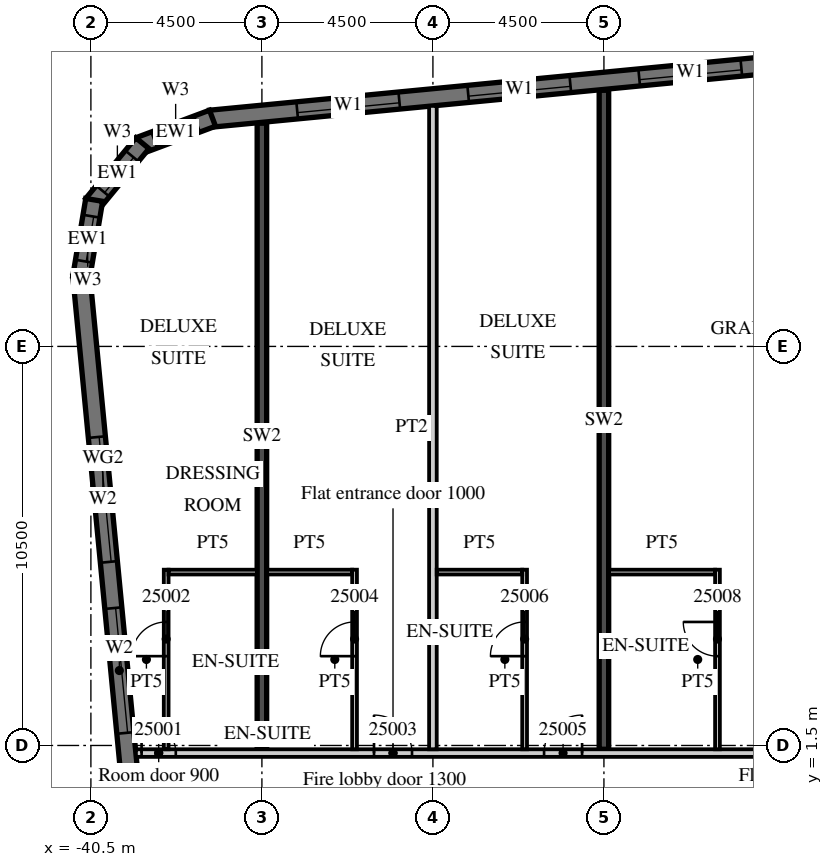
"""IFC4 building model, lengths in metres.
Left out: names, types, materials, properties, quantities, classifications, styles, units other than length and angle.
Written with IfcOpenShell. Run it as: python <this file> out.ifc"""

import sys

from ifc_helpers import new_model, si_unit, direction, frame, frame_2d, origin, place, context, subcontext, project, spatial, polyline, rectangle, outline, extrude, element, fill, save


model = new_model("IFC4")
c1 = context("Model", 3, precision=1e-05, world=origin(), true_north=direction((0.0, 1.0)))
c2 = subcontext(c1, "Body", "Model", "MODEL_VIEW")
j1 = project(units=[si_unit("LENGTHUNIT", "METRE"), si_unit("PLANEANGLEUNIT", "RADIAN")], contexts=[c1])
p1 = place(None, origin())
s1 = spatial("IfcSite", under=j1, at=p1, CompositionType="ELEMENT")
p2 = place(p1, origin())
s2 = spatial("IfcBuilding", under=s1, at=p2, CompositionType="ELEMENT")
p3 = place(p2, frame((0.0, 0.0, 117.4)))
s3 = spatial("IfcBuildingStorey", under=s2, at=p3, CompositionType="ELEMENT", Elevation=117.4)
p4 = place(p3, frame((-36.0, 1.4, 0.0), z_axis=(0.0, 0.0, 1.0), x_axis=(0.0, 1.0, 0.0)))
e1 = element("IfcWall", 1, at=p4, inside=s3, PredefinedType="SHEAR", context=c2, shape_type="SweptSolid", body=[
    extrude(rectangle(XDim=16.474, YDim=0.25, at=frame_2d((8.237, 0.0))), origin(), (0.0, 0.0, 1.0), 3.3),
])
p5 = place(p3, frame((-27.0, 1.4, 0.0), z_axis=(0.0, 0.0, 1.0), x_axis=(0.0, 1.0, 0.0)))
e2 = element("IfcWall", 2, at=p5, inside=s3, PredefinedType="SHEAR", context=c2, shape_type="SweptSolid", body=[
    extrude(rectangle(XDim=17.34, YDim=0.25, at=frame_2d((8.67, 0.0))), origin(), (0.0, 0.0, 1.0), 3.3),
])
p6 = place(p3, frame((-40.753, 13.872, 0.0), z_axis=(0.0, 0.0, 1.0), x_axis=(0.095843327381, -0.995396431878, 0.0)))
e3 = element("IfcWall", 3, at=p6, inside=s3, PredefinedType="SOLIDWALL", context=c2, shape_type="SweptSolid", body=[
    extrude(rectangle(XDim=35.0, YDim=0.45, at=frame_2d((17.5, 0.0))), origin(), (0.0, 0.0, 1.0), 3.02),
])
p7 = place(p6, frame((4.277, 0.0, 0.45)))
e4 = element("IfcOpeningElement", 4, at=p7, cuts=e3, PredefinedType="OPENING", context=c2, shape_type="SweptSolid", body=[
    extrude(rectangle(XDim=3.3, YDim=2.25, at=frame_2d((1.65, 1.125))), frame((0.0, 0.235, 0.0), z_axis=(0.0, -1.0, 0.0), x_axis=(1.0, 0.0, 0.0)), (0.0, 0.0, 1.0), 0.47),
])
p8 = place(p6, frame((8.798, 0.0, 0.45)))
e5 = element("IfcOpeningElement", 5, at=p8, cuts=e3, PredefinedType="OPENING", context=c2, shape_type="SweptSolid", body=[
    extrude(rectangle(XDim=3.3, YDim=2.25, at=frame_2d((1.65, 1.125))), frame((0.0, 0.235, 0.0), z_axis=(0.0, -1.0, 0.0), x_axis=(1.0, 0.0, 0.0)), (0.0, 0.0, 1.0), 0.47),
])
p9 = place(p3, frame((13.521, 22.89, 0.0), z_axis=(0.0, 0.0, 1.0), x_axis=(-0.995396445054, -0.095843190545, 0.0)))
e6 = element("IfcWall", 6, at=p9, inside=s3, PredefinedType="SOLIDWALL", context=c2, shape_type="SweptSolid", body=[
    extrude(rectangle(XDim=51.114, YDim=0.45, at=frame_2d((25.557, 0.0))), origin(), (0.0, 0.0, 1.0), 3.02),
])
p10 = place(p9, frame((0.91, 0.0, 0.45)))
e7 = element("IfcOpeningElement", 7, at=p10, cuts=e6, PredefinedType="OPENING", context=c2, shape_type="SweptSolid", body=[
    extrude(rectangle(XDim=2.7, YDim=2.25, at=frame_2d((1.35, 1.125))), frame((0.0, 0.235, 0.0), z_axis=(0.0, -1.0, 0.0), x_axis=(1.0, 0.0, 0.0)), (0.0, 0.0, 1.0), 0.47),
])
p11 = place(p9, frame((5.431, 0.0, 0.45)))
e8 = element("IfcOpeningElement", 8, at=p11, cuts=e6, PredefinedType="OPENING", context=c2, shape_type="SweptSolid", body=[
    extrude(rectangle(XDim=2.7, YDim=2.25, at=frame_2d((1.35, 1.125))), frame((0.0, 0.235, 0.0), z_axis=(0.0, -1.0, 0.0), x_axis=(1.0, 0.0, 0.0)), (0.0, 0.0, 1.0), 0.47),
])
p12 = place(p9, frame((9.952, 0.0, 0.45)))
e9 = element("IfcOpeningElement", 9, at=p12, cuts=e6, PredefinedType="OPENING", context=c2, shape_type="SweptSolid", body=[
    extrude(rectangle(XDim=2.7, YDim=2.25, at=frame_2d((1.35, 1.125))), frame((0.0, 0.235, 0.0), z_axis=(0.0, -1.0, 0.0), x_axis=(1.0, 0.0, 0.0)), (0.0, 0.0, 1.0), 0.47),
])
p13 = place(p9, frame((14.473, 0.0, 0.45)))
e10 = element("IfcOpeningElement", 10, at=p13, cuts=e6, PredefinedType="OPENING", context=c2, shape_type="SweptSolid", body=[
    extrude(rectangle(XDim=2.7, YDim=2.25, at=frame_2d((1.35, 1.125))), frame((0.0, 0.235, 0.0), z_axis=(0.0, -1.0, 0.0), x_axis=(1.0, 0.0, 0.0)), (0.0, 0.0, 1.0), 0.47),
])
p14 = place(p9, frame((18.994, 0.0, 0.45)))
e11 = element("IfcOpeningElement", 11, at=p14, cuts=e6, PredefinedType="OPENING", context=c2, shape_type="SweptSolid", body=[
    extrude(rectangle(XDim=2.7, YDim=2.25, at=frame_2d((1.35, 1.125))), frame((0.0, 0.235, 0.0), z_axis=(0.0, -1.0, 0.0), x_axis=(1.0, 0.0, 0.0)), (0.0, 0.0, 1.0), 0.47),
])
p15 = place(p9, frame((23.514, 0.0, 0.45)))
e12 = element("IfcOpeningElement", 12, at=p15, cuts=e6, PredefinedType="OPENING", context=c2, shape_type="SweptSolid", body=[
    extrude(rectangle(XDim=2.7, YDim=2.25, at=frame_2d((1.35, 1.125))), frame((0.0, 0.235, 0.0), z_axis=(0.0, -1.0, 0.0), x_axis=(1.0, 0.0, 0.0)), (0.0, 0.0, 1.0), 0.47),
])
p16 = place(p9, frame((28.035, 0.0, 0.45)))
e13 = element("IfcOpeningElement", 13, at=p16, cuts=e6, PredefinedType="OPENING", context=c2, shape_type="SweptSolid", body=[
    extrude(rectangle(XDim=2.7, YDim=2.25, at=frame_2d((1.35, 1.125))), frame((0.0, 0.235, 0.0), z_axis=(0.0, -1.0, 0.0), x_axis=(1.0, 0.0, 0.0)), (0.0, 0.0, 1.0), 0.47),
])
p17 = place(p9, frame((32.556, 0.0, 0.45)))
e14 = element("IfcOpeningElement", 14, at=p17, cuts=e6, PredefinedType="OPENING", context=c2, shape_type="SweptSolid", body=[
    extrude(rectangle(XDim=2.7, YDim=2.25, at=frame_2d((1.35, 1.125))), frame((0.0, 0.235, 0.0), z_axis=(0.0, -1.0, 0.0), x_axis=(1.0, 0.0, 0.0)), (0.0, 0.0, 1.0), 0.47),
])
p18 = place(p9, frame((37.077, 0.0, 0.45)))
e15 = element("IfcOpeningElement", 15, at=p18, cuts=e6, PredefinedType="OPENING", context=c2, shape_type="SweptSolid", body=[
    extrude(rectangle(XDim=2.7, YDim=2.25, at=frame_2d((1.35, 1.125))), frame((0.0, 0.235, 0.0), z_axis=(0.0, -1.0, 0.0), x_axis=(1.0, 0.0, 0.0)), (0.0, 0.0, 1.0), 0.47),
])
p19 = place(p9, frame((41.598, 0.0, 0.45)))
e16 = element("IfcOpeningElement", 16, at=p19, cuts=e6, PredefinedType="OPENING", context=c2, shape_type="SweptSolid", body=[
    extrude(rectangle(XDim=2.7, YDim=2.25, at=frame_2d((1.35, 1.125))), frame((0.0, 0.235, 0.0), z_axis=(0.0, -1.0, 0.0), x_axis=(1.0, 0.0, 0.0)), (0.0, 0.0, 1.0), 0.47),
])
p20 = place(p9, frame((46.118, 0.0, 0.45)))
e17 = element("IfcOpeningElement", 17, at=p20, cuts=e6, PredefinedType="OPENING", context=c2, shape_type="SweptSolid", body=[
    extrude(rectangle(XDim=2.7, YDim=2.25, at=frame_2d((1.35, 1.125))), frame((0.0, 0.235, 0.0), z_axis=(0.0, -1.0, 0.0), x_axis=(1.0, 0.0, 0.0)), (0.0, 0.0, 1.0), 0.47),
])
p21 = place(p3, frame((-37.3, 18.004, 0.0), z_axis=(0.0, 0.0, 1.0), x_axis=(-0.936677599948, -0.350192909346, 0.0)))
e18 = element("IfcWall", 18, at=p21, inside=s3, PredefinedType="SOLIDWALL", context=c2, shape_type="SweptSolid", body=[
    extrude(outline(polyline([(0.0, -0.225), (2.071, -0.225), (1.95, 0.225), (0.121, 0.225), (0.0, -0.225)])), origin(), (0.0, 0.0, 1.0), 3.02),
])
p22 = place(p21, frame((0.435, 0.0, 0.45)))
e19 = element("IfcOpeningElement", 19, at=p22, cuts=e18, PredefinedType="OPENING", context=c2, shape_type="SweptSolid", body=[
    extrude(rectangle(XDim=1.2, YDim=2.25, at=frame_2d((0.6, 1.125))), frame((0.0, 0.235, 0.0), z_axis=(0.0, -1.0, 0.0), x_axis=(1.0, 0.0, 0.0)), (0.0, 0.0, 1.0), 0.47),
])
p23 = place(p3, frame((-39.145, 17.347, 0.0), z_axis=(0.0, 0.0, 1.0), x_axis=(-0.636046112757, -0.771651049663, 0.0)))
e20 = element("IfcWall", 20, at=p23, inside=s3, PredefinedType="SOLIDWALL", context=c2, shape_type="SweptSolid", body=[
    extrude(outline(polyline([(0.0, -0.225), (2.071, -0.225), (1.95, 0.225), (0.121, 0.225), (0.0, -0.225)])), origin(), (0.0, 0.0, 1.0), 3.02),
])
p24 = place(p23, frame((0.435, 0.0, 0.45)))
e21 = element("IfcOpeningElement", 21, at=p24, cuts=e20, PredefinedType="OPENING", context=c2, shape_type="SweptSolid", body=[
    extrude(rectangle(XDim=1.2, YDim=2.25, at=frame_2d((0.6, 1.125))), frame((0.0, 0.235, 0.0), z_axis=(0.0, -1.0, 0.0), x_axis=(1.0, 0.0, 0.0)), (0.0, 0.0, 1.0), 0.47),
])
p25 = place(p3, frame((-40.413, 15.855, 0.0), z_axis=(0.0, 0.0, 1.0), x_axis=(-0.165068144653, -0.986282164302, 0.0)))
e22 = element("IfcWall", 22, at=p25, inside=s3, PredefinedType="SOLIDWALL", context=c2, shape_type="SweptSolid", body=[
    extrude(outline(polyline([(0.0, -0.225), (2.071, -0.225), (1.95, 0.225), (0.121, 0.225), (0.0, -0.225)])), origin(), (0.0, 0.0, 1.0), 3.02),
])
p26 = place(p25, frame((0.435, 0.0, 0.45)))
e23 = element("IfcOpeningElement", 23, at=p26, cuts=e22, PredefinedType="OPENING", context=c2, shape_type="SweptSolid", body=[
    extrude(rectangle(XDim=1.2, YDim=2.25, at=frame_2d((0.6, 1.125))), frame((0.0, 0.235, 0.0), z_axis=(0.0, -1.0, 0.0), x_axis=(1.0, 0.0, 0.0)), (0.0, 0.0, 1.0), 0.47),
])
p27 = place(p3, frame((-39.316, 1.3, 0.0), z_axis=(0.0, 0.0, 1.0), x_axis=(1.0, 0.0, 0.0)))
e24 = element("IfcWall", 24, at=p27, inside=s3, PredefinedType="PARTITIONING", context=c2, shape_type="SweptSolid", body=[
    extrude(rectangle(XDim=52.816, YDim=0.2, at=frame_2d((26.408, 0.0))), origin(), (0.0, 0.0, 1.0), 3.02),
])
p28 = place(p27, frame((0.15, 0.0, 0.0)))
e25 = element("IfcOpeningElement", 25, at=p28, cuts=e24, PredefinedType="OPENING", context=c2, shape_type="SweptSolid", body=[
    extrude(rectangle(XDim=0.9, YDim=2.1, at=frame_2d((0.45, 1.05))), frame((0.0, 0.11, 0.0), z_axis=(0.0, -1.0, 0.0), x_axis=(1.0, 0.0, 0.0)), (0.0, 0.0, 1.0), 0.22),
])
p29 = place(p27, frame((6.266, 0.0, 0.0)))
e26 = element("IfcOpeningElement", 26, at=p29, cuts=e24, PredefinedType="OPENING", context=c2, shape_type="SweptSolid", body=[
    extrude(rectangle(XDim=1.0, YDim=2.1, at=frame_2d((0.5, 1.05))), frame((0.0, 0.11, 0.0), z_axis=(0.0, -1.0, 0.0), x_axis=(1.0, 0.0, 0.0)), (0.0, 0.0, 1.0), 0.22),
])
p30 = place(p27, frame((10.741, 0.0, 0.0)))
e27 = element("IfcOpeningElement", 27, at=p30, cuts=e24, PredefinedType="OPENING", context=c2, shape_type="SweptSolid", body=[
    extrude(rectangle(XDim=1.0, YDim=2.1, at=frame_2d((0.5, 1.05))), frame((0.0, 0.11, 0.0), z_axis=(0.0, -1.0, 0.0), x_axis=(1.0, 0.0, 0.0)), (0.0, 0.0, 1.0), 0.22),
])
p31 = place(p27, frame((17.678, 0.0, 0.0)))
e28 = element("IfcOpeningElement", 28, at=p31, cuts=e24, PredefinedType="OPENING", context=c2, shape_type="SweptSolid", body=[
    extrude(rectangle(XDim=1.2, YDim=2.1, at=frame_2d((0.6, 1.05))), frame((0.0, 0.11, 0.0), z_axis=(0.0, -1.0, 0.0), x_axis=(1.0, 0.0, 0.0)), (0.0, 0.0, 1.0), 0.22),
])
p32 = place(p27, frame((26.678, 0.0, 0.0)))
e29 = element("IfcOpeningElement", 29, at=p32, cuts=e24, PredefinedType="OPENING", context=c2, shape_type="SweptSolid", body=[
    extrude(rectangle(XDim=1.2, YDim=2.1, at=frame_2d((0.6, 1.05))), frame((0.0, 0.11, 0.0), z_axis=(0.0, -1.0, 0.0), x_axis=(1.0, 0.0, 0.0)), (0.0, 0.0, 1.0), 0.22),
])
p33 = place(p27, frame((35.678, 0.0, 0.0)))
e30 = element("IfcOpeningElement", 30, at=p33, cuts=e24, PredefinedType="OPENING", context=c2, shape_type="SweptSolid", body=[
    extrude(rectangle(XDim=1.2, YDim=2.1, at=frame_2d((0.6, 1.05))), frame((0.0, 0.11, 0.0), z_axis=(0.0, -1.0, 0.0), x_axis=(1.0, 0.0, 0.0)), (0.0, 0.0, 1.0), 0.22),
])
p34 = place(p27, frame((41.754, 0.0, 0.0)))
e31 = element("IfcOpeningElement", 31, at=p34, cuts=e24, PredefinedType="OPENING", context=c2, shape_type="SweptSolid", body=[
    extrude(rectangle(XDim=1.2, YDim=2.1, at=frame_2d((0.6, 1.05))), frame((0.0, 0.11, 0.0), z_axis=(0.0, -1.0, 0.0), x_axis=(1.0, 0.0, 0.0)), (0.0, 0.0, 1.0), 0.22),
])
p35 = place(p27, frame((51.241, 0.0, 0.0)))
e32 = element("IfcOpeningElement", 32, at=p35, cuts=e24, PredefinedType="OPENING", context=c2, shape_type="SweptSolid", body=[
    extrude(rectangle(XDim=1.0, YDim=2.1, at=frame_2d((0.5, 1.05))), frame((0.0, 0.11, 0.0), z_axis=(0.0, -1.0, 0.0), x_axis=(1.0, 0.0, 0.0)), (0.0, 0.0, 1.0), 0.22),
])
p36 = place(p3, frame((-38.519, 1.4, 0.0), z_axis=(0.0, 0.0, 1.0), x_axis=(0.0, 1.0, 0.0)))
e33 = element("IfcWall", 33, at=p36, inside=s3, PredefinedType="PARTITIONING", context=c2, shape_type="SweptSolid", body=[
    extrude(rectangle(XDim=4.725, YDim=0.125, at=frame_2d((2.363, 0.0))), origin(), (0.0, 0.0, 1.0), 3.02),
])
p37 = place(p36, frame((2.45, 0.0, 0.0)))
e34 = element("IfcOpeningElement", 34, at=p37, cuts=e33, PredefinedType="OPENING", context=c2, shape_type="SweptSolid", body=[
    extrude(rectangle(XDim=0.9, YDim=2.1, at=frame_2d((0.45, 1.05))), frame((0.0, 0.073, 0.0), z_axis=(0.0, -1.0, 0.0), x_axis=(1.0, 0.0, 0.0)), (0.0, 0.0, 1.0), 0.145),
])
p38 = place(p3, frame((-38.457, 6.062, 0.0), z_axis=(0.0, 0.0, 1.0), x_axis=(1.0, 0.0, 0.0)))
e35 = element("IfcWall", 35, at=p38, inside=s3, PredefinedType="PARTITIONING", context=c2, shape_type="SweptSolid", body=[
    extrude(rectangle(XDim=2.332, YDim=0.125, at=frame_2d((1.166, 0.0))), origin(), (0.0, 0.0, 1.0), 3.02),
])
p39 = place(p3, frame((-31.5, 1.4, 0.0), z_axis=(0.0, 0.0, 1.0), x_axis=(0.0, 1.0, 0.0)))
e36 = element("IfcWall", 36, at=p39, inside=s3, PredefinedType="PARTITIONING", context=c2, shape_type="SweptSolid", body=[
    extrude(rectangle(XDim=16.929, YDim=0.2, at=frame_2d((8.465, 0.0))), origin(), (0.0, 0.0, 1.0), 3.02),
])
p40 = place(p3, frame((-33.562, 1.4, 0.0), z_axis=(0.0, 0.0, 1.0), x_axis=(0.0, 1.0, 0.0)))
e37 = element("IfcWall", 37, at=p40, inside=s3, PredefinedType="PARTITIONING", context=c2, shape_type="SweptSolid", body=[
    extrude(rectangle(XDim=4.725, YDim=0.125, at=frame_2d((2.363, 0.0))), origin(), (0.0, 0.0, 1.0), 3.02),
])
p41 = place(p40, frame((2.45, 0.0, 0.0)))
e38 = element("IfcOpeningElement", 38, at=p41, cuts=e37, PredefinedType="OPENING", context=c2, shape_type="SweptSolid", body=[
    extrude(rectangle(XDim=0.9, YDim=2.1, at=frame_2d((0.45, 1.05))), frame((0.0, 0.073, 0.0), z_axis=(0.0, -1.0, 0.0), x_axis=(1.0, 0.0, 0.0)), (0.0, 0.0, 1.0), 0.145),
])
p42 = place(p3, frame((-35.875, 6.062, 0.0), z_axis=(0.0, 0.0, 1.0), x_axis=(1.0, 0.0, 0.0)))
e39 = element("IfcWall", 39, at=p42, inside=s3, PredefinedType="PARTITIONING", context=c2, shape_type="SweptSolid", body=[
    extrude(rectangle(XDim=2.25, YDim=0.125, at=frame_2d((1.125, 0.0))), origin(), (0.0, 0.0, 1.0), 3.02),
])
p43 = place(p3, frame((-29.087, 1.4, 0.0), z_axis=(0.0, 0.0, 1.0), x_axis=(0.0, 1.0, 0.0)))
e40 = element("IfcWall", 40, at=p43, inside=s3, PredefinedType="PARTITIONING", context=c2, shape_type="SweptSolid", body=[
    extrude(rectangle(XDim=4.725, YDim=0.125, at=frame_2d((2.363, 0.0))), origin(), (0.0, 0.0, 1.0), 3.02),
])
p44 = place(p43, frame((2.45, 0.0, 0.0)))
e41 = element("IfcOpeningElement", 41, at=p44, cuts=e40, PredefinedType="OPENING", context=c2, shape_type="SweptSolid", body=[
    extrude(rectangle(XDim=0.9, YDim=2.1, at=frame_2d((0.45, 1.05))), frame((0.0, 0.073, 0.0), z_axis=(0.0, -1.0, 0.0), x_axis=(1.0, 0.0, 0.0)), (0.0, 0.0, 1.0), 0.145),
])
p45 = place(p3, frame((-31.4, 6.062, 0.0), z_axis=(0.0, 0.0, 1.0), x_axis=(1.0, 0.0, 0.0)))
e42 = element("IfcWall", 42, at=p45, inside=s3, PredefinedType="PARTITIONING", context=c2, shape_type="SweptSolid", body=[
    extrude(rectangle(XDim=2.25, YDim=0.125, at=frame_2d((1.125, 0.0))), origin(), (0.0, 0.0, 1.0), 3.02),
])
p46 = place(p3, frame((-24.012, 1.4, 0.0), z_axis=(0.0, 0.0, 1.0), x_axis=(0.0, 1.0, 0.0)))
e43 = element("IfcWall", 43, at=p46, inside=s3, PredefinedType="PARTITIONING", context=c2, shape_type="SweptSolid", body=[
    extrude(rectangle(XDim=4.725, YDim=0.125, at=frame_2d((2.363, 0.0))), origin(), (0.0, 0.0, 1.0), 3.02),
])
p47 = place(p46, frame((2.45, 0.0, 0.0)))
e44 = element("IfcOpeningElement", 44, at=p47, cuts=e43, PredefinedType="OPENING", context=c2, shape_type="SweptSolid", body=[
    extrude(rectangle(XDim=0.9, YDim=2.1, at=frame_2d((0.45, 1.05))), frame((0.0, 0.073, 0.0), z_axis=(0.0, -1.0, 0.0), x_axis=(1.0, 0.0, 0.0)), (0.0, 0.0, 1.0), 0.145),
])
p48 = place(p3, frame((-26.875, 6.062, 0.0), z_axis=(0.0, 0.0, 1.0), x_axis=(1.0, 0.0, 0.0)))
e45 = element("IfcWall", 45, at=p48, inside=s3, PredefinedType="PARTITIONING", context=c2, shape_type="SweptSolid", body=[
    extrude(rectangle(XDim=2.8, YDim=0.125, at=frame_2d((1.4, 0.0))), origin(), (0.0, 0.0, 1.0), 3.02),
])
p49 = place(p7, origin())
e46 = element("IfcWindow", 46, at=p49, inside=s3, PartitioningType="SINGLE_PANEL", PredefinedType="WINDOW", context=c2, shape_type="SweptSolid", body=[
    extrude(rectangle(XDim=3.3, YDim=2.25, at=frame_2d((1.65, 1.125))), frame((0.0, 0.09, 0.0), z_axis=(0.0, -1.0, 0.0), x_axis=(1.0, 0.0, 0.0)), (0.0, 0.0, 1.0), 0.06),
])
fill(e4, e46)
p50 = place(p8, origin())
e47 = element("IfcWindow", 47, at=p50, inside=s3, PartitioningType="SINGLE_PANEL", PredefinedType="WINDOW", context=c2, shape_type="SweptSolid", body=[
    extrude(rectangle(XDim=3.3, YDim=2.25, at=frame_2d((1.65, 1.125))), frame((0.0, 0.09, 0.0), z_axis=(0.0, -1.0, 0.0), x_axis=(1.0, 0.0, 0.0)), (0.0, 0.0, 1.0), 0.06),
])
fill(e5, e47)
p51 = place(p18, origin())
e48 = element("IfcWindow", 48, at=p51, inside=s3, PartitioningType="SINGLE_PANEL", PredefinedType="WINDOW", context=c2, shape_type="SweptSolid", body=[
    extrude(rectangle(XDim=2.7, YDim=2.25, at=frame_2d((1.35, 1.125))), frame((0.0, 0.09, 0.0), z_axis=(0.0, -1.0, 0.0), x_axis=(1.0, 0.0, 0.0)), (0.0, 0.0, 1.0), 0.06),
])
fill(e15, e48)
p52 = place(p19, origin())
e49 = element("IfcWindow", 49, at=p52, inside=s3, PartitioningType="SINGLE_PANEL", PredefinedType="WINDOW", context=c2, shape_type="SweptSolid", body=[
    extrude(rectangle(XDim=2.7, YDim=2.25, at=frame_2d((1.35, 1.125))), frame((0.0, 0.09, 0.0), z_axis=(0.0, -1.0, 0.0), x_axis=(1.0, 0.0, 0.0)), (0.0, 0.0, 1.0), 0.06),
])
fill(e16, e49)
p53 = place(p20, origin())
e50 = element("IfcWindow", 50, at=p53, inside=s3, PartitioningType="SINGLE_PANEL", PredefinedType="WINDOW", context=c2, shape_type="SweptSolid", body=[
    extrude(rectangle(XDim=2.7, YDim=2.25, at=frame_2d((1.35, 1.125))), frame((0.0, 0.09, 0.0), z_axis=(0.0, -1.0, 0.0), x_axis=(1.0, 0.0, 0.0)), (0.0, 0.0, 1.0), 0.06),
])
fill(e17, e50)
p54 = place(p22, origin())
e51 = element("IfcWindow", 51, at=p54, inside=s3, PartitioningType="SINGLE_PANEL", PredefinedType="WINDOW", context=c2, shape_type="SweptSolid", body=[
    extrude(rectangle(XDim=1.2, YDim=2.25, at=frame_2d((0.6, 1.125))), frame((0.0, 0.09, 0.0), z_axis=(0.0, -1.0, 0.0), x_axis=(1.0, 0.0, 0.0)), (0.0, 0.0, 1.0), 0.06),
])
fill(e19, e51)
p55 = place(p24, origin())
e52 = element("IfcWindow", 52, at=p55, inside=s3, PartitioningType="SINGLE_PANEL", PredefinedType="WINDOW", context=c2, shape_type="SweptSolid", body=[
    extrude(rectangle(XDim=1.2, YDim=2.25, at=frame_2d((0.6, 1.125))), frame((0.0, 0.09, 0.0), z_axis=(0.0, -1.0, 0.0), x_axis=(1.0, 0.0, 0.0)), (0.0, 0.0, 1.0), 0.06),
])
fill(e21, e52)
p56 = place(p26, origin())
e53 = element("IfcWindow", 53, at=p56, inside=s3, PartitioningType="SINGLE_PANEL", PredefinedType="WINDOW", context=c2, shape_type="SweptSolid", body=[
    extrude(rectangle(XDim=1.2, YDim=2.25, at=frame_2d((0.6, 1.125))), frame((0.0, 0.09, 0.0), z_axis=(0.0, -1.0, 0.0), x_axis=(1.0, 0.0, 0.0)), (0.0, 0.0, 1.0), 0.06),
])
fill(e23, e53)
p57 = place(p28, origin())
e54 = element("IfcDoor", 54, at=p57, inside=s3, OperationType="SINGLE_SWING_LEFT", PredefinedType="DOOR", context=c2, shape_type="SweptSolid", body=[
    extrude(rectangle(XDim=0.9, YDim=2.1, at=frame_2d((0.45, 1.05))), frame((0.0, 0.025, 0.0), z_axis=(0.0, -1.0, 0.0), x_axis=(1.0, 0.0, 0.0)), (0.0, 0.0, 1.0), 0.05),
])
fill(e25, e54)
p58 = place(p37, origin())
e55 = element("IfcDoor", 55, at=p58, inside=s3, OperationType="SINGLE_SWING_LEFT", PredefinedType="DOOR", context=c2, shape_type="SweptSolid", body=[
    extrude(rectangle(XDim=0.9, YDim=2.1, at=frame_2d((0.45, 1.05))), frame((0.0, 0.025, 0.0), z_axis=(0.0, -1.0, 0.0), x_axis=(1.0, 0.0, 0.0)), (0.0, 0.0, 1.0), 0.05),
])
fill(e34, e55)
p59 = place(p29, origin())
e56 = element("IfcDoor", 56, at=p59, inside=s3, OperationType="SINGLE_SWING_LEFT", PredefinedType="DOOR", context=c2, shape_type="SweptSolid", body=[
    extrude(rectangle(XDim=1.0, YDim=2.1, at=frame_2d((0.5, 1.05))), frame((0.0, 0.025, 0.0), z_axis=(0.0, -1.0, 0.0), x_axis=(1.0, 0.0, 0.0)), (0.0, 0.0, 1.0), 0.05),
])
fill(e26, e56)
p60 = place(p41, origin())
e57 = element("IfcDoor", 57, at=p60, inside=s3, OperationType="SINGLE_SWING_LEFT", PredefinedType="DOOR", context=c2, shape_type="SweptSolid", body=[
    extrude(rectangle(XDim=0.9, YDim=2.1, at=frame_2d((0.45, 1.05))), frame((0.0, 0.025, 0.0), z_axis=(0.0, -1.0, 0.0), x_axis=(1.0, 0.0, 0.0)), (0.0, 0.0, 1.0), 0.05),
])
fill(e38, e57)
p61 = place(p30, origin())
e58 = element("IfcDoor", 58, at=p61, inside=s3, OperationType="SINGLE_SWING_RIGHT", PredefinedType="DOOR", context=c2, shape_type="SweptSolid", body=[
    extrude(rectangle(XDim=1.0, YDim=2.1, at=frame_2d((0.5, 1.05))), frame((0.0, 0.025, 0.0), z_axis=(0.0, -1.0, 0.0), x_axis=(1.0, 0.0, 0.0)), (0.0, 0.0, 1.0), 0.05),
])
fill(e27, e58)
p62 = place(p44, origin())
e59 = element("IfcDoor", 59, at=p62, inside=s3, OperationType="SINGLE_SWING_LEFT", PredefinedType="DOOR", context=c2, shape_type="SweptSolid", body=[
    extrude(rectangle(XDim=0.9, YDim=2.1, at=frame_2d((0.45, 1.05))), frame((0.0, 0.025, 0.0), z_axis=(0.0, -1.0, 0.0), x_axis=(1.0, 0.0, 0.0)), (0.0, 0.0, 1.0), 0.05),
])
fill(e41, e59)
p63 = place(p47, origin())
e60 = element("IfcDoor", 60, at=p63, inside=s3, OperationType="SINGLE_SWING_RIGHT", PredefinedType="DOOR", context=c2, shape_type="SweptSolid", body=[
    extrude(rectangle(XDim=0.9, YDim=2.1, at=frame_2d((0.45, 1.05))), frame((0.0, 0.025, 0.0), z_axis=(0.0, -1.0, 0.0), x_axis=(1.0, 0.0, 0.0)), (0.0, 0.0, 1.0), 0.05),
])
fill(e44, e60)
save(model, sys.argv[1])
